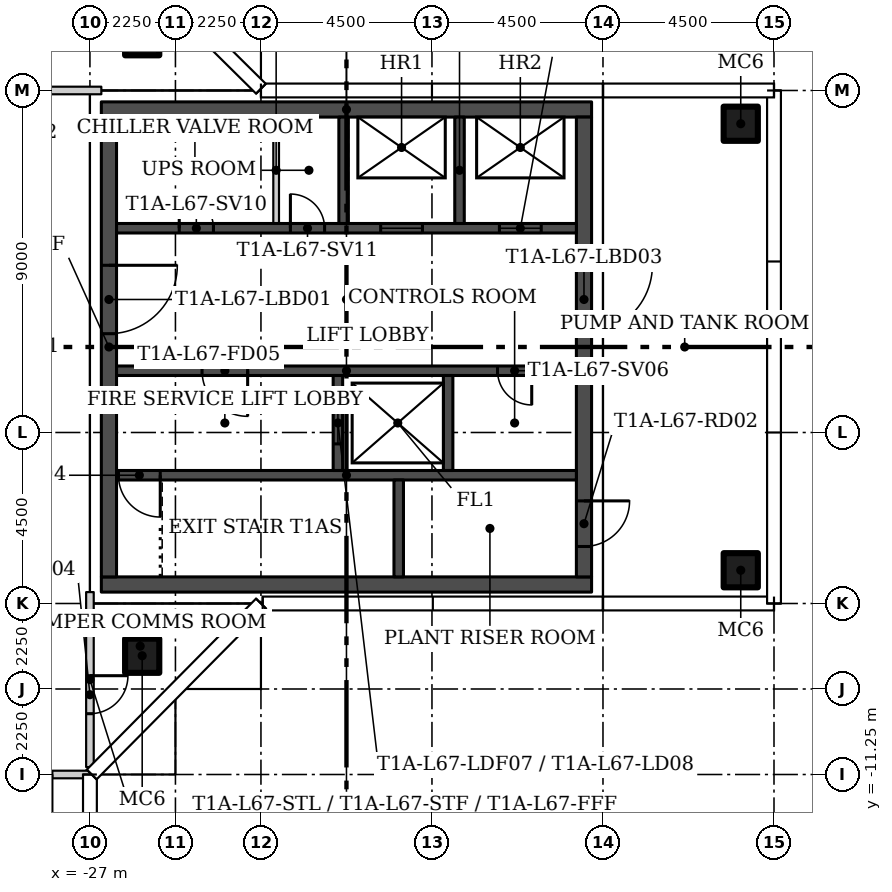
"""IFC4 building model, lengths in metres.
Left out: names, types, materials, properties, quantities, classifications, styles, units other than length and angle.
Written with IfcOpenShell. Run it as: python <this file> out.ifc"""

import sys

from ifc_helpers import new_model, si_unit, direction, frame, frame_2d, origin, origin_2d, place, context, subcontext, project, spatial, rectangle, hollow_rectangle, extrude, element, fill, save


model = new_model("IFC4")
c1 = context("Model", 3, precision=1e-05, world=origin(), true_north=direction((0.0, 1.0)))
c2 = subcontext(c1, "Body", "Model", "MODEL_VIEW")
j1 = project(units=[si_unit("LENGTHUNIT", "METRE"), si_unit("PLANEANGLEUNIT", "RADIAN")], contexts=[c1])
p1 = place(None, origin())
s1 = spatial("IfcSite", under=j1, at=p1, CompositionType="ELEMENT")
p2 = place(p1, origin())
s2 = spatial("IfcBuilding", under=s1, at=p2, CompositionType="ELEMENT")
p3 = place(p2, frame((0.0, 0.0, 278.3)))
s3 = spatial("IfcBuildingStorey", under=s2, at=p3, CompositionType="ELEMENT", Elevation=278.3)
for number, where in (
    (1, (-25.625, 8.125, 0.0)),
    (2, (-25.625, -8.125, 0.0)),
    (3, (-9.875, -5.875, 0.0)),
    (4, (-9.875, 5.875, 0.0)),
):
    element("IfcColumn", number, at=place(p3, frame(where)), inside=s3, PredefinedType="COLUMN", context=c2, shape_type="SweptSolid", body=[
        extrude(hollow_rectangle(XDim=0.9, YDim=0.9, WallThickness=0.036, at=origin_2d()), origin(), (0.0, 0.0, 1.0), 5.55),
    ])
p4 = place(p3, frame((-29.85, 6.75, 0.0)))
e5 = element("IfcWall", 5, at=p4, inside=s3, PredefinedType="PARTITIONING", context=c2, shape_type="SweptSolid", body=[
    extrude(rectangle(XDim=3.15, YDim=0.2, at=frame_2d((1.575, 0.0))), origin(), (0.0, 0.0, 1.0), 5.55),
])
p5 = place(p3, frame((-26.995, -11.25, 0.0), z_axis=(0.0, 0.0, 1.0), x_axis=(-1.0, 0.0, 0.0)))
e6 = element("IfcWall", 6, at=p5, inside=s3, PredefinedType="PARTITIONING", context=c2, shape_type="SweptSolid", body=[
    extrude(rectangle(XDim=3.005, YDim=0.2, at=frame_2d((1.502, 0.0))), origin(), (0.0, 0.0, 1.0), 5.55),
])
p6 = place(p5, frame((1.005, 0.0, 0.0)))
e7 = element("IfcOpeningElement", 7, at=p6, cuts=e6, PredefinedType="OPENING", context=c2, shape_type="SweptSolid", body=[
    extrude(rectangle(XDim=1.0, YDim=2.1, at=frame_2d((0.5, 1.05))), frame((0.0, 0.11, 0.0), z_axis=(0.0, -1.0, 0.0), x_axis=(1.0, 0.0, 0.0)), (0.0, 0.0, 1.0), 0.22),
])
p7 = place(p3, frame((-27.0, -6.45, 0.0), z_axis=(0.0, 0.0, 1.0), x_axis=(0.0, -1.0, 0.0)))
e8 = element("IfcWall", 8, at=p7, inside=s3, PredefinedType="PARTITIONING", context=c2, shape_type="SweptSolid", body=[
    extrude(rectangle(XDim=4.605, YDim=0.2, at=frame_2d((2.302, 0.0))), origin(), (0.0, 0.0, 1.0), 5.55),
])
p8 = place(p7, frame((2.2, 0.0, 0.0)))
e9 = element("IfcOpeningElement", 9, at=p8, cuts=e8, PredefinedType="OPENING", context=c2, shape_type="SweptSolid", body=[
    extrude(rectangle(XDim=1.0, YDim=2.1, at=frame_2d((0.5, 1.05))), frame((0.0, 0.11, 0.0), z_axis=(0.0, -1.0, 0.0), x_axis=(1.0, 0.0, 0.0)), (0.0, 0.0, 1.0), 0.22),
])
for number, where in (
    (10, (-26.7, -6.25, 0.0)),
    (11, (-26.7, 6.25, 0.0)),
):
    element("IfcWall", number, at=place(p3, frame(where)), inside=s3, PredefinedType="SHEAR", context=c2, shape_type="SweptSolid", body=[
        extrude(rectangle(XDim=12.9, YDim=0.4, at=frame_2d((6.45, 0.0))), origin(), (0.0, 0.0, 1.0), 5.55),
    ])
p9 = place(p3, frame((-26.5, 6.05, 0.0), z_axis=(0.0, 0.0, 1.0), x_axis=(0.0, -1.0, 0.0)))
e12 = element("IfcWall", 12, at=p9, inside=s3, PredefinedType="SHEAR", context=c2, shape_type="SweptSolid", body=[
    extrude(rectangle(XDim=12.1, YDim=0.4, at=frame_2d((6.05, 0.0))), origin(), (0.0, 0.0, 1.0), 5.55),
])
p10 = place(p9, frame((3.9, 0.0, 0.0)))
e13 = element("IfcOpeningElement", 13, at=p10, cuts=e12, PredefinedType="OPENING", context=c2, shape_type="SweptSolid", body=[
    extrude(rectangle(XDim=1.8, YDim=2.4, at=frame_2d((0.9, 1.2))), frame((0.0, 0.21, 0.0), z_axis=(0.0, -1.0, 0.0), x_axis=(1.0, 0.0, 0.0)), (0.0, 0.0, 1.0), 0.42),
])
p11 = place(p3, frame((-14.0, 6.05, 0.0), z_axis=(0.0, 0.0, 1.0), x_axis=(0.0, -1.0, 0.0)))
e14 = element("IfcWall", 14, at=p11, inside=s3, PredefinedType="SHEAR", context=c2, shape_type="SweptSolid", body=[
    extrude(rectangle(XDim=12.1, YDim=0.4, at=frame_2d((6.05, 0.0))), origin(), (0.0, 0.0, 1.0), 5.55),
])
p12 = place(p11, frame((10.1, 0.0, 0.0)))
e15 = element("IfcOpeningElement", 15, at=p12, cuts=e14, PredefinedType="OPENING", context=c2, shape_type="SweptSolid", body=[
    extrude(rectangle(XDim=1.2, YDim=2.1, at=frame_2d((0.6, 1.05))), frame((0.0, 0.21, 0.0), z_axis=(0.0, -1.0, 0.0), x_axis=(1.0, 0.0, 0.0)), (0.0, 0.0, 1.0), 0.42),
])
p13 = place(p11, frame((3.9, 0.0, 0.0)))
e16 = element("IfcOpeningElement", 16, at=p13, cuts=e14, PredefinedType="OPENING", context=c2, shape_type="SweptSolid", body=[
    extrude(rectangle(XDim=1.8, YDim=2.4, at=frame_2d((0.9, 1.2))), frame((0.0, 0.21, 0.0), z_axis=(0.0, -1.0, 0.0), x_axis=(1.0, 0.0, 0.0)), (0.0, 0.0, 1.0), 0.42),
])
p14 = place(p3, frame((-14.2, -3.375, 0.0), z_axis=(0.0, 0.0, 1.0), x_axis=(-1.0, 0.0, 0.0)))
e17 = element("IfcWall", 17, at=p14, inside=s3, PredefinedType="SHEAR", context=c2, shape_type="SweptSolid", body=[
    extrude(rectangle(XDim=12.1, YDim=0.25, at=frame_2d((6.05, 0.0))), origin(), (0.0, 0.0, 1.0), 5.55),
])
p15 = place(p14, frame((10.95, 0.0, 0.0)))
e18 = element("IfcOpeningElement", 18, at=p15, cuts=e17, PredefinedType="OPENING", context=c2, shape_type="SweptSolid", body=[
    extrude(rectangle(XDim=1.1, YDim=2.1, at=frame_2d((0.55, 1.05))), frame((0.0, 0.135, 0.0), z_axis=(0.0, -1.0, 0.0), x_axis=(1.0, 0.0, 0.0)), (0.0, 0.0, 1.0), 0.27),
])
p16 = place(p3, frame((-18.875, -6.05, 0.0), z_axis=(0.0, 0.0, 1.0), x_axis=(0.0, 1.0, 0.0)))
e19 = element("IfcWall", 19, at=p16, inside=s3, PredefinedType="SHEAR", context=c2, shape_type="SweptSolid", body=[
    extrude(rectangle(XDim=2.55, YDim=0.25, at=frame_2d((1.275, 0.0))), origin(), (0.0, 0.0, 1.0), 5.55),
])
p17 = place(p3, frame((-14.2, -0.625, 0.0), z_axis=(0.0, 0.0, 1.0), x_axis=(-1.0, 0.0, 0.0)))
e20 = element("IfcWall", 20, at=p17, inside=s3, PredefinedType="SHEAR", context=c2, shape_type="SweptSolid", body=[
    extrude(rectangle(XDim=12.1, YDim=0.25, at=frame_2d((6.05, 0.0))), origin(), (0.0, 0.0, 1.0), 5.55),
])
p18 = place(p17, frame((8.65, 0.0, 0.0)))
e21 = element("IfcOpeningElement", 21, at=p18, cuts=e20, PredefinedType="OPENING", context=c2, shape_type="SweptSolid", body=[
    extrude(rectangle(XDim=1.2, YDim=2.1, at=frame_2d((0.6, 1.05))), frame((0.0, 0.135, 0.0), z_axis=(0.0, -1.0, 0.0), x_axis=(1.0, 0.0, 0.0)), (0.0, 0.0, 1.0), 0.27),
])
p19 = place(p17, frame((1.175, 0.0, 0.0)))
e22 = element("IfcOpeningElement", 22, at=p19, cuts=e20, PredefinedType="OPENING", context=c2, shape_type="SweptSolid", body=[
    extrude(rectangle(XDim=0.9, YDim=2.1, at=frame_2d((0.45, 1.05))), frame((0.0, 0.135, 0.0), z_axis=(0.0, -1.0, 0.0), x_axis=(1.0, 0.0, 0.0)), (0.0, 0.0, 1.0), 0.27),
])
p20 = place(p3, frame((-20.475, -3.25, 0.0), z_axis=(0.0, 0.0, 1.0), x_axis=(0.0, 1.0, 0.0)))
e23 = element("IfcWall", 23, at=p20, inside=s3, PredefinedType="SHEAR", context=c2, shape_type="SweptSolid", body=[
    extrude(rectangle(XDim=2.5, YDim=0.25, at=frame_2d((1.25, 0.0))), origin(), (0.0, 0.0, 1.0), 5.55),
])
p21 = place(p20, frame((0.7, 0.0, 0.0)))
e24 = element("IfcOpeningElement", 24, at=p21, cuts=e23, PredefinedType="OPENING", context=c2, shape_type="SweptSolid", body=[
    extrude(rectangle(XDim=1.1, YDim=2.1, at=frame_2d((0.55, 1.05))), frame((0.0, 0.135, 0.0), z_axis=(0.0, -1.0, 0.0), x_axis=(1.0, 0.0, 0.0)), (0.0, 0.0, 1.0), 0.27),
])
p22 = place(p3, frame((-17.575, -3.25, 0.0), z_axis=(0.0, 0.0, 1.0), x_axis=(0.0, 1.0, 0.0)))
e25 = element("IfcWall", 25, at=p22, inside=s3, PredefinedType="SHEAR", context=c2, shape_type="SweptSolid", body=[
    extrude(rectangle(XDim=2.5, YDim=0.25, at=frame_2d((1.25, 0.0))), origin(), (0.0, 0.0, 1.0), 5.55),
])
p23 = place(p3, frame((-26.3, 3.125, 0.0)))
e26 = element("IfcWall", 26, at=p23, inside=s3, PredefinedType="SHEAR", context=c2, shape_type="SweptSolid", body=[
    extrude(rectangle(XDim=12.1, YDim=0.25, at=frame_2d((6.05, 0.0))), origin(), (0.0, 0.0, 1.0), 5.55),
])
p24 = place(p23, frame((6.95, 0.0, 0.0)))
e27 = element("IfcOpeningElement", 27, at=p24, cuts=e26, PredefinedType="OPENING", context=c2, shape_type="SweptSolid", body=[
    extrude(rectangle(XDim=1.1, YDim=2.1, at=frame_2d((0.55, 1.05))), frame((0.0, 0.135, 0.0), z_axis=(0.0, -1.0, 0.0), x_axis=(1.0, 0.0, 0.0)), (0.0, 0.0, 1.0), 0.27),
])
p25 = place(p23, frame((10.075, 0.0, 0.0)))
e28 = element("IfcOpeningElement", 28, at=p25, cuts=e26, PredefinedType="OPENING", context=c2, shape_type="SweptSolid", body=[
    extrude(rectangle(XDim=1.1, YDim=2.1, at=frame_2d((0.55, 1.05))), frame((0.0, 0.135, 0.0), z_axis=(0.0, -1.0, 0.0), x_axis=(1.0, 0.0, 0.0)), (0.0, 0.0, 1.0), 0.27),
])
p26 = place(p23, frame((1.65, 0.0, 0.0)))
e29 = element("IfcOpeningElement", 29, at=p26, cuts=e26, PredefinedType="OPENING", context=c2, shape_type="SweptSolid", body=[
    extrude(rectangle(XDim=0.9, YDim=2.1, at=frame_2d((0.45, 1.05))), frame((0.0, 0.135, 0.0), z_axis=(0.0, -1.0, 0.0), x_axis=(1.0, 0.0, 0.0)), (0.0, 0.0, 1.0), 0.27),
])
p27 = place(p23, frame((4.575, 0.0, 0.0)))
e30 = element("IfcOpeningElement", 30, at=p27, cuts=e26, PredefinedType="OPENING", context=c2, shape_type="SweptSolid", body=[
    extrude(rectangle(XDim=0.9, YDim=2.1, at=frame_2d((0.45, 1.05))), frame((0.0, 0.135, 0.0), z_axis=(0.0, -1.0, 0.0), x_axis=(1.0, 0.0, 0.0)), (0.0, 0.0, 1.0), 0.27),
])
for number, where, z_axis, x_axis in (
    (31, (-20.325, 3.25, 0.0), (0.0, 0.0, 1.0), (0.0, 1.0, 0.0)),
    (32, (-17.275, 3.25, 0.0), (0.0, 0.0, 1.0), (0.0, 1.0, 0.0)),
):
    element("IfcWall", number, at=place(p3, frame(where, z_axis=z_axis, x_axis=x_axis)), inside=s3, PredefinedType="SHEAR", context=c2, shape_type="SweptSolid", body=[
        extrude(rectangle(XDim=2.8, YDim=0.25, at=frame_2d((1.4, 0.0))), origin(), (0.0, 0.0, 1.0), 5.55),
    ])
p28 = place(p3, frame((-22.1, 3.25, 0.0), z_axis=(0.0, 0.0, 1.0), x_axis=(0.0, 1.0, 0.0)))
e33 = element("IfcWall", 33, at=p28, inside=s3, PredefinedType="PARTITIONING", context=c2, shape_type="SweptSolid", body=[
    extrude(rectangle(XDim=2.8, YDim=0.15, at=frame_2d((1.4, 0.0))), origin(), (0.0, 0.0, 1.0), 5.55),
])
p29 = place(p8, origin())
e34 = element("IfcDoor", 34, at=p29, inside=s3, OperationType="SINGLE_SWING_RIGHT", PredefinedType="DOOR", context=c2, shape_type="SweptSolid", body=[
    extrude(rectangle(XDim=1.0, YDim=2.1, at=frame_2d((0.5, 1.05))), frame((0.0, 0.025, 0.0), z_axis=(0.0, -1.0, 0.0), x_axis=(1.0, 0.0, 0.0)), (0.0, 0.0, 1.0), 0.05),
])
fill(e9, e34)
p30 = place(p10, origin())
e35 = element("IfcDoor", 35, at=p30, inside=s3, OperationType="DOUBLE_DOOR_SINGLE_SWING", PredefinedType="DOOR", context=c2, shape_type="SweptSolid", body=[
    extrude(rectangle(XDim=1.8, YDim=2.4, at=frame_2d((0.9, 1.2))), frame((0.0, 0.025, 0.0), z_axis=(0.0, -1.0, 0.0), x_axis=(1.0, 0.0, 0.0)), (0.0, 0.0, 1.0), 0.05),
])
fill(e13, e35)
p31 = place(p12, origin())
e36 = element("IfcDoor", 36, at=p31, inside=s3, OperationType="SINGLE_SWING_RIGHT", PredefinedType="DOOR", context=c2, shape_type="SweptSolid", body=[
    extrude(rectangle(XDim=1.2, YDim=2.1, at=frame_2d((0.6, 1.05))), frame((0.0, 0.025, 0.0), z_axis=(0.0, -1.0, 0.0), x_axis=(1.0, 0.0, 0.0)), (0.0, 0.0, 1.0), 0.05),
])
fill(e15, e36)
p32 = place(p13, origin())
e37 = element("IfcDoor", 37, at=p32, inside=s3, OperationType="DOUBLE_DOOR_SINGLE_SWING", PredefinedType="DOOR", context=c2, shape_type="SweptSolid", body=[
    extrude(rectangle(XDim=1.8, YDim=2.4, at=frame_2d((0.9, 1.2))), frame((0.0, 0.025, 0.0), z_axis=(0.0, -1.0, 0.0), x_axis=(1.0, 0.0, 0.0)), (0.0, 0.0, 1.0), 0.05),
])
fill(e16, e37)
p33 = place(p15, origin())
e38 = element("IfcDoor", 38, at=p33, inside=s3, OperationType="SINGLE_SWING_RIGHT", PredefinedType="DOOR", context=c2, shape_type="SweptSolid", body=[
    extrude(rectangle(XDim=1.1, YDim=2.1, at=frame_2d((0.55, 1.05))), frame((0.0, 0.025, 0.0), z_axis=(0.0, -1.0, 0.0), x_axis=(1.0, 0.0, 0.0)), (0.0, 0.0, 1.0), 0.05),
])
fill(e18, e38)
p34 = place(p18, origin())
e39 = element("IfcDoor", 39, at=p34, inside=s3, OperationType="SINGLE_SWING_RIGHT", PredefinedType="DOOR", context=c2, shape_type="SweptSolid", body=[
    extrude(rectangle(XDim=1.2, YDim=2.1, at=frame_2d((0.6, 1.05))), frame((0.0, 0.025, 0.0), z_axis=(0.0, -1.0, 0.0), x_axis=(1.0, 0.0, 0.0)), (0.0, 0.0, 1.0), 0.05),
])
fill(e21, e39)
p35 = place(p19, origin())
e40 = element("IfcDoor", 40, at=p35, inside=s3, OperationType="SINGLE_SWING_LEFT", PredefinedType="DOOR", context=c2, shape_type="SweptSolid", body=[
    extrude(rectangle(XDim=0.9, YDim=2.1, at=frame_2d((0.45, 1.05))), frame((0.0, 0.025, 0.0), z_axis=(0.0, -1.0, 0.0), x_axis=(1.0, 0.0, 0.0)), (0.0, 0.0, 1.0), 0.05),
])
fill(e22, e40)
p36 = place(p21, origin())
e41 = element("IfcDoor", 41, at=p36, inside=s3, OperationType="SLIDING_TO_LEFT", PredefinedType="DOOR", context=c2, shape_type="SweptSolid", body=[
    extrude(rectangle(XDim=1.1, YDim=2.1, at=frame_2d((0.55, 1.05))), frame((0.0, 0.025, 0.0), z_axis=(0.0, -1.0, 0.0), x_axis=(1.0, 0.0, 0.0)), (0.0, 0.0, 1.0), 0.05),
])
fill(e24, e41)
p37 = place(p24, origin())
e42 = element("IfcDoor", 42, at=p37, inside=s3, OperationType="SLIDING_TO_LEFT", PredefinedType="DOOR", context=c2, shape_type="SweptSolid", body=[
    extrude(rectangle(XDim=1.1, YDim=2.1, at=frame_2d((0.55, 1.05))), frame((0.0, 0.025, 0.0), z_axis=(0.0, -1.0, 0.0), x_axis=(1.0, 0.0, 0.0)), (0.0, 0.0, 1.0), 0.05),
])
fill(e27, e42)
p38 = place(p25, origin())
e43 = element("IfcDoor", 43, at=p38, inside=s3, OperationType="SLIDING_TO_LEFT", PredefinedType="DOOR", context=c2, shape_type="SweptSolid", body=[
    extrude(rectangle(XDim=1.1, YDim=2.1, at=frame_2d((0.55, 1.05))), frame((0.0, 0.025, 0.0), z_axis=(0.0, -1.0, 0.0), x_axis=(1.0, 0.0, 0.0)), (0.0, 0.0, 1.0), 0.05),
])
fill(e28, e43)
p39 = place(p26, origin())
e44 = element("IfcDoor", 44, at=p39, inside=s3, OperationType="SINGLE_SWING_LEFT", PredefinedType="DOOR", context=c2, shape_type="SweptSolid", body=[
    extrude(rectangle(XDim=0.9, YDim=2.1, at=frame_2d((0.45, 1.05))), frame((0.0, 0.025, 0.0), z_axis=(0.0, -1.0, 0.0), x_axis=(1.0, 0.0, 0.0)), (0.0, 0.0, 1.0), 0.05),
])
fill(e29, e44)
p40 = place(p27, origin())
e45 = element("IfcDoor", 45, at=p40, inside=s3, OperationType="SINGLE_SWING_LEFT", PredefinedType="DOOR", context=c2, shape_type="SweptSolid", body=[
    extrude(rectangle(XDim=0.9, YDim=2.1, at=frame_2d((0.45, 1.05))), frame((0.0, 0.025, 0.0), z_axis=(0.0, -1.0, 0.0), x_axis=(1.0, 0.0, 0.0)), (0.0, 0.0, 1.0), 0.05),
])
fill(e30, e45)
save(model, sys.argv[1])
